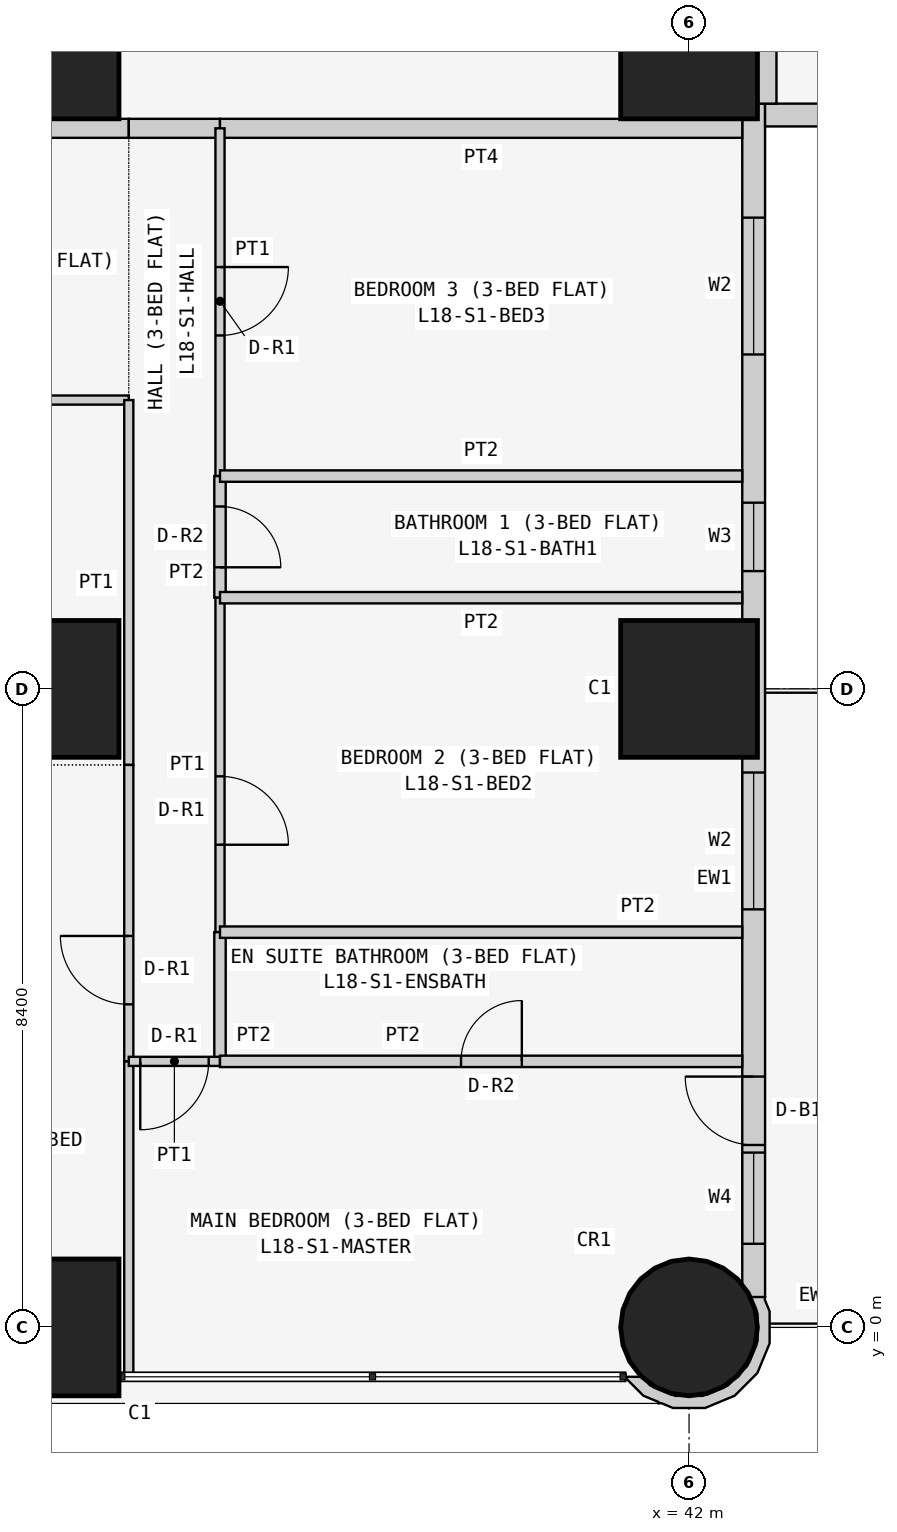
"""IFC4 building model, lengths in metres.
Left out: names, types, materials, properties, quantities, classifications, styles, units other than length and angle.
Written with IfcOpenShell. Run it as: python <this file> out.ifc"""

import sys

from ifc_helpers import new_model, si_unit, direction, frame, frame_2d, origin, origin_2d, place, context, subcontext, project, spatial, polyline, rectangle, circle, outline, extrude, element, fill, save


model = new_model("IFC4")
c1 = context("Model", 3, precision=1e-05, world=origin(), true_north=direction((0.0, 1.0)))
c2 = subcontext(c1, "Body", "Model", "MODEL_VIEW")
j1 = project(units=[si_unit("LENGTHUNIT", "METRE"), si_unit("PLANEANGLEUNIT", "RADIAN")], contexts=[c1])
p1 = place(None, origin())
s1 = spatial("IfcSite", under=j1, at=p1, CompositionType="ELEMENT")
p2 = place(p1, origin())
s2 = spatial("IfcBuilding", under=s1, at=p2, CompositionType="ELEMENT")
p3 = place(p2, frame((0.0, 0.0, 74.1)))
s3 = spatial("IfcBuildingStorey", under=s2, at=p3, CompositionType="ELEMENT", Elevation=74.1)
for number, where, z_axis, x_axis in (
    (1, (33.6, 0.0, 0.0), (0.0, 0.0, 1.0), (1.0, 0.0, 0.0)),
    (2, (33.6, 8.4, 0.0), (0.0, 0.0, 1.0), (1.0, 0.0, 0.0)),
    (3, (33.6, 16.8, 0.0), (0.0, 0.0, 1.0), (1.0, 0.0, 0.0)),
):
    element("IfcColumn", number, at=place(p3, frame(where, z_axis=z_axis, x_axis=x_axis)), inside=s3, PredefinedType="COLUMN", context=c2, shape_type="SweptSolid", body=[
        extrude(rectangle(XDim=1.8, YDim=1.8, at=origin_2d()), origin(), (0.0, 0.0, 1.0), 3.6),
    ])
p4 = place(p3, frame((42.0, 0.0, 0.0), z_axis=(0.0, 0.0, 1.0), x_axis=(1.0, 0.0, 0.0)))
e4 = element("IfcColumn", 4, at=p4, inside=s3, PredefinedType="COLUMN", context=c2, shape_type="SweptSolid", body=[
    extrude(circle(Radius=0.9, at=origin_2d()), origin(), (0.0, 0.0, 1.0), 3.6),
])
for number, where, z_axis, x_axis in (
    (5, (42.0, 8.4, 0.0), (0.0, 0.0, 1.0), (1.0, 0.0, 0.0)),
    (6, (42.0, 16.8, 0.0), (0.0, 0.0, 1.0), (1.0, 0.0, 0.0)),
):
    element("IfcColumn", number, at=place(p3, frame(where, z_axis=z_axis, x_axis=x_axis)), inside=s3, PredefinedType="COLUMN", context=c2, shape_type="SweptSolid", body=[
        extrude(rectangle(XDim=1.8, YDim=1.8, at=origin_2d()), origin(), (0.0, 0.0, 1.0), 3.6),
    ])
p5 = place(p3, frame((42.85, 0.4, 0.0), z_axis=(0.0, 0.0, 1.0), x_axis=(0.0, 1.0, 0.0)))
e7 = element("IfcWall", 7, at=p5, inside=s3, PredefinedType="SOLIDWALL", context=c2, shape_type="SweptSolid", body=[
    extrude(rectangle(XDim=15.7, YDim=0.3, at=frame_2d((7.85, 0.0))), origin(), (0.0, 0.0, 1.0), 3.45),
])
p6 = place(p5, frame((12.4, 0.0, 0.9)))
e8 = element("IfcOpeningElement", 8, at=p6, cuts=e7, PredefinedType="OPENING", context=c2, shape_type="SweptSolid", body=[
    extrude(rectangle(XDim=1.8, YDim=1.5, at=frame_2d((0.9, 0.75))), frame((0.0, 0.16, 0.0), z_axis=(0.0, -1.0, 0.0), x_axis=(1.0, 0.0, 0.0)), (0.0, 0.0, 1.0), 0.32),
])
p7 = place(p5, frame((9.55, 0.0, 1.5)))
e9 = element("IfcOpeningElement", 9, at=p7, cuts=e7, PredefinedType="OPENING", context=c2, shape_type="SweptSolid", body=[
    extrude(rectangle(XDim=0.9, YDim=0.7, at=frame_2d((0.45, 0.35))), frame((0.0, 0.16, 0.0), z_axis=(0.0, -1.0, 0.0), x_axis=(1.0, 0.0, 0.0)), (0.0, 0.0, 1.0), 0.32),
])
p8 = place(p5, frame((5.1, 0.0, 0.9)))
e10 = element("IfcOpeningElement", 10, at=p8, cuts=e7, PredefinedType="OPENING", context=c2, shape_type="SweptSolid", body=[
    extrude(rectangle(XDim=1.8, YDim=1.5, at=frame_2d((0.9, 0.75))), frame((0.0, 0.16, 0.0), z_axis=(0.0, -1.0, 0.0), x_axis=(1.0, 0.0, 0.0)), (0.0, 0.0, 1.0), 0.32),
])
p9 = place(p5, frame((2.0, 0.0, 0.0)))
e11 = element("IfcOpeningElement", 11, at=p9, cuts=e7, PredefinedType="OPENING", context=c2, shape_type="SweptSolid", body=[
    extrude(rectangle(XDim=0.9, YDim=2.4, at=frame_2d((0.45, 1.2))), frame((0.0, 0.16, 0.0), z_axis=(0.0, -1.0, 0.0), x_axis=(1.0, 0.0, 0.0)), (0.0, 0.0, 1.0), 0.32),
])
p10 = place(p5, frame((0.7, 0.0, 0.9)))
e12 = element("IfcOpeningElement", 12, at=p10, cuts=e7, PredefinedType="OPENING", context=c2, shape_type="SweptSolid", body=[
    extrude(rectangle(XDim=1.2, YDim=1.5, at=frame_2d((0.6, 0.75))), frame((0.0, 0.16, 0.0), z_axis=(0.0, -1.0, 0.0), x_axis=(1.0, 0.0, 0.0)), (0.0, 0.0, 1.0), 0.32),
])
p11 = place(p3, frame((43.0, 15.95, 0.0), z_axis=(0.0, 0.0, 1.0), x_axis=(1.0, 0.0, 0.0)))
e13 = element("IfcWall", 13, at=p11, inside=s3, PredefinedType="SOLIDWALL", context=c2, shape_type="SweptSolid", body=[
    extrude(rectangle(XDim=15.4, YDim=0.3, at=frame_2d((7.7, 0.0))), origin(), (0.0, 0.0, 1.0), 3.45),
])
p12 = place(p11, frame((1.2, 0.0, 0.9)))
e14 = element("IfcOpeningElement", 14, at=p12, cuts=e13, PredefinedType="OPENING", context=c2, shape_type="SweptSolid", body=[
    extrude(rectangle(XDim=1.8, YDim=1.5, at=frame_2d((0.9, 0.75))), frame((0.0, 0.16, 0.0), z_axis=(0.0, -1.0, 0.0), x_axis=(1.0, 0.0, 0.0)), (0.0, 0.0, 1.0), 0.32),
])
p13 = place(p11, frame((4.95, 0.0, 1.5)))
e15 = element("IfcOpeningElement", 15, at=p13, cuts=e13, PredefinedType="OPENING", context=c2, shape_type="SweptSolid", body=[
    extrude(rectangle(XDim=0.9, YDim=0.7, at=frame_2d((0.45, 0.35))), frame((0.0, 0.16, 0.0), z_axis=(0.0, -1.0, 0.0), x_axis=(1.0, 0.0, 0.0)), (0.0, 0.0, 1.0), 0.32),
])
p14 = place(p11, frame((8.5, 0.0, 0.9)))
e16 = element("IfcOpeningElement", 16, at=p14, cuts=e13, PredefinedType="OPENING", context=c2, shape_type="SweptSolid", body=[
    extrude(rectangle(XDim=1.8, YDim=1.5, at=frame_2d((0.9, 0.75))), frame((0.0, 0.16, 0.0), z_axis=(0.0, -1.0, 0.0), x_axis=(1.0, 0.0, 0.0)), (0.0, 0.0, 1.0), 0.32),
])
p15 = place(p11, frame((12.5, 0.0, 0.0)))
e17 = element("IfcOpeningElement", 17, at=p15, cuts=e13, PredefinedType="OPENING", context=c2, shape_type="SweptSolid", body=[
    extrude(rectangle(XDim=0.9, YDim=2.4, at=frame_2d((0.45, 1.2))), frame((0.0, 0.16, 0.0), z_axis=(0.0, -1.0, 0.0), x_axis=(1.0, 0.0, 0.0)), (0.0, 0.0, 1.0), 0.32),
])
p16 = place(p11, frame((13.5, 0.0, 0.9)))
e18 = element("IfcOpeningElement", 18, at=p16, cuts=e13, PredefinedType="OPENING", context=c2, shape_type="SweptSolid", body=[
    extrude(rectangle(XDim=1.2, YDim=1.5, at=frame_2d((0.6, 0.75))), frame((0.0, 0.16, 0.0), z_axis=(0.0, -1.0, 0.0), x_axis=(1.0, 0.0, 0.0)), (0.0, 0.0, 1.0), 0.32),
])
p17 = place(p3, frame((41.233, -0.611, 0.0), z_axis=(0.0, 0.0, 1.0), x_axis=(0.377204953059, -0.926129809145, 0.0)))
e19 = element("IfcWall", 19, at=p17, inside=s3, PredefinedType="SOLIDWALL", context=c2, shape_type="SweptSolid", body=[
    extrude(outline(polyline([(0.319, 1.843), (-0.072, 2.001), (-0.24, 2.001), (-0.269, 2.017), (-0.37, 1.841), (-0.102, 1.842), (0.23, 1.707), (0.485, 1.455), (0.624, 1.125), (0.626, 0.766), (0.49, 0.434), (0.239, 0.179), (0.09, 0.117), (0.011, -0.078), (0.024, -0.083), (0.33, 0.045), (0.48, 0.197), (0.499, 0.193), (0.508, 0.225), (0.626, 0.345), (0.785, 0.736), (0.782, 1.157), (0.619, 1.546), (0.319, 1.843)])), origin(), (0.0, 0.0, 1.0), 3.45),
])
p18 = place(p3, frame((43.025, 22.971, 0.0), z_axis=(0.0, 0.0, 1.0), x_axis=(0.0, -1.0, 0.0)))
e20 = element("IfcWall", 20, at=p18, inside=s3, PredefinedType="PARTITIONING", context=c2, shape_type="SweptSolid", body=[
    extrude(rectangle(XDim=6.871, YDim=0.25, at=frame_2d((3.436, 0.0))), origin(), (0.0, 0.0, 1.0), 3.45),
])
p19 = place(p3, frame((34.629, 15.775, 0.0), z_axis=(0.0, 0.0, 1.0), x_axis=(-1.0, 0.0, 0.0)))
e21 = element("IfcWall", 21, at=p19, inside=s3, PredefinedType="PARTITIONING", context=c2, shape_type="SweptSolid", body=[
    extrude(rectangle(XDim=5.229, YDim=0.25, at=frame_2d((2.615, 0.0))), origin(), (0.0, 0.0, 1.0), 3.45),
])
p20 = place(p19, frame((2.129, 0.0, 0.0)))
e22 = element("IfcOpeningElement", 22, at=p20, cuts=e21, PredefinedType="OPENING", context=c2, shape_type="SweptSolid", body=[
    extrude(rectangle(XDim=1.0, YDim=2.1, at=frame_2d((0.5, 1.05))), frame((0.0, 0.135, 0.0), z_axis=(0.0, -1.0, 0.0), x_axis=(1.0, 0.0, 0.0)), (0.0, 0.0, 1.0), 0.27),
])
p21 = place(p3, frame((35.829, 15.775, 0.0), z_axis=(0.0, 0.0, 1.0), x_axis=(-1.0, 0.0, 0.0)))
e23 = element("IfcWall", 23, at=p21, inside=s3, PredefinedType="PARTITIONING", context=c2, shape_type="SweptSolid", body=[
    extrude(rectangle(XDim=1.2, YDim=0.25, at=frame_2d((0.6, 0.0))), origin(), (0.0, 0.0, 1.0), 3.45),
])
p22 = place(p3, frame((42.7, 15.775, 0.0), z_axis=(0.0, 0.0, 1.0), x_axis=(-1.0, 0.0, 0.0)))
e24 = element("IfcWall", 24, at=p22, inside=s3, PredefinedType="PARTITIONING", context=c2, shape_type="SweptSolid", body=[
    extrude(rectangle(XDim=6.871, YDim=0.25, at=frame_2d((3.436, 0.0))), origin(), (0.0, 0.0, 1.0), 3.45),
])
p23 = place(p3, frame((29.4, 12.2, 0.0), z_axis=(0.0, 0.0, 1.0), x_axis=(1.0, 0.0, 0.0)))
e25 = element("IfcWall", 25, at=p23, inside=s3, PredefinedType="PARTITIONING", context=c2, shape_type="SweptSolid", body=[
    extrude(rectangle(XDim=5.229, YDim=0.12, at=frame_2d((2.615, 0.0))), origin(), (0.0, 0.0, 1.0), 3.45),
])
p24 = place(p23, frame((1.05, 0.0, 0.0)))
e26 = element("IfcOpeningElement", 26, at=p24, cuts=e25, PredefinedType="OPENING", context=c2, shape_type="SweptSolid", body=[
    extrude(rectangle(XDim=0.9, YDim=2.1, at=frame_2d((0.45, 1.05))), frame((0.0, 0.07, 0.0), z_axis=(0.0, -1.0, 0.0), x_axis=(1.0, 0.0, 0.0)), (0.0, 0.0, 1.0), 0.14),
])
p25 = place(p3, frame((34.629, 7.4, 0.0), z_axis=(0.0, 0.0, 1.0), x_axis=(0.0, 1.0, 0.0)))
e27 = element("IfcWall", 27, at=p25, inside=s3, PredefinedType="PARTITIONING", context=c2, shape_type="SweptSolid", body=[
    extrude(rectangle(XDim=4.8, YDim=0.12, at=frame_2d((2.4, 0.0))), origin(), (0.0, 0.0, 1.0), 3.45),
])
p26 = place(p3, frame((34.629, 3.5, 0.0), z_axis=(0.0, 0.0, 1.0), x_axis=(0.0, 1.0, 0.0)))
e28 = element("IfcWall", 28, at=p26, inside=s3, PredefinedType="PARTITIONING", context=c2, shape_type="SweptSolid", body=[
    extrude(rectangle(XDim=3.9, YDim=0.12, at=frame_2d((1.95, 0.0))), origin(), (0.0, 0.0, 1.0), 3.45),
])
p27 = place(p26, frame((0.75, 0.0, 0.0)))
e29 = element("IfcOpeningElement", 29, at=p27, cuts=e28, PredefinedType="OPENING", context=c2, shape_type="SweptSolid", body=[
    extrude(rectangle(XDim=0.9, YDim=2.1, at=frame_2d((0.45, 1.05))), frame((0.0, 0.07, 0.0), z_axis=(0.0, -1.0, 0.0), x_axis=(1.0, 0.0, 0.0)), (0.0, 0.0, 1.0), 0.14),
])
p28 = place(p3, frame((34.629, -0.65, 0.0), z_axis=(0.0, 0.0, 1.0), x_axis=(0.0, 1.0, 0.0)))
e30 = element("IfcWall", 30, at=p28, inside=s3, PredefinedType="PARTITIONING", context=c2, shape_type="SweptSolid", body=[
    extrude(rectangle(XDim=4.15, YDim=0.12, at=frame_2d((2.075, 0.0))), origin(), (0.0, 0.0, 1.0), 3.45),
])
p29 = place(p3, frame((35.829, 11.2, 0.0), z_axis=(0.0, 0.0, 1.0), x_axis=(0.0, 1.0, 0.0)))
e31 = element("IfcWall", 31, at=p29, inside=s3, PredefinedType="PARTITIONING", context=c2, shape_type="SweptSolid", body=[
    extrude(rectangle(XDim=4.575, YDim=0.12, at=frame_2d((2.288, 0.0))), origin(), (0.0, 0.0, 1.0), 3.45),
])
p30 = place(p29, frame((1.85, 0.0, 0.0)))
e32 = element("IfcOpeningElement", 32, at=p30, cuts=e31, PredefinedType="OPENING", context=c2, shape_type="SweptSolid", body=[
    extrude(rectangle(XDim=0.9, YDim=2.1, at=frame_2d((0.45, 1.05))), frame((0.0, 0.07, 0.0), z_axis=(0.0, -1.0, 0.0), x_axis=(1.0, 0.0, 0.0)), (0.0, 0.0, 1.0), 0.14),
])
p31 = place(p3, frame((35.829, 9.6, 0.0), z_axis=(0.0, 0.0, 1.0), x_axis=(0.0, 1.0, 0.0)))
e33 = element("IfcWall", 33, at=p31, inside=s3, PredefinedType="PARTITIONING", context=c2, shape_type="SweptSolid", body=[
    extrude(rectangle(XDim=1.6, YDim=0.15, at=frame_2d((0.8, 0.0))), origin(), (0.0, 0.0, 1.0), 3.45),
])
p32 = place(p31, frame((0.4, 0.0, 0.0)))
e34 = element("IfcOpeningElement", 34, at=p32, cuts=e33, PredefinedType="OPENING", context=c2, shape_type="SweptSolid", body=[
    extrude(rectangle(XDim=0.8, YDim=2.1, at=frame_2d((0.4, 1.05))), frame((0.0, 0.085, 0.0), z_axis=(0.0, -1.0, 0.0), x_axis=(1.0, 0.0, 0.0)), (0.0, 0.0, 1.0), 0.17),
])
p33 = place(p3, frame((35.829, 5.2, 0.0), z_axis=(0.0, 0.0, 1.0), x_axis=(0.0, 1.0, 0.0)))
e35 = element("IfcWall", 35, at=p33, inside=s3, PredefinedType="PARTITIONING", context=c2, shape_type="SweptSolid", body=[
    extrude(rectangle(XDim=4.4, YDim=0.12, at=frame_2d((2.2, 0.0))), origin(), (0.0, 0.0, 1.0), 3.45),
])
p34 = place(p33, frame((1.15, 0.0, 0.0)))
e36 = element("IfcOpeningElement", 36, at=p34, cuts=e35, PredefinedType="OPENING", context=c2, shape_type="SweptSolid", body=[
    extrude(rectangle(XDim=0.9, YDim=2.1, at=frame_2d((0.45, 1.05))), frame((0.0, 0.07, 0.0), z_axis=(0.0, -1.0, 0.0), x_axis=(1.0, 0.0, 0.0)), (0.0, 0.0, 1.0), 0.14),
])
p35 = place(p3, frame((35.829, 3.5, 0.0), z_axis=(0.0, 0.0, 1.0), x_axis=(0.0, 1.0, 0.0)))
e37 = element("IfcWall", 37, at=p35, inside=s3, PredefinedType="PARTITIONING", context=c2, shape_type="SweptSolid", body=[
    extrude(rectangle(XDim=1.7, YDim=0.15, at=frame_2d((0.85, 0.0))), origin(), (0.0, 0.0, 1.0), 3.45),
])
p36 = place(p3, frame((34.629, 3.5, 0.0), z_axis=(0.0, 0.0, 1.0), x_axis=(1.0, 0.0, 0.0)))
e38 = element("IfcWall", 38, at=p36, inside=s3, PredefinedType="PARTITIONING", context=c2, shape_type="SweptSolid", body=[
    extrude(rectangle(XDim=1.2, YDim=0.12, at=frame_2d((0.6, 0.0))), origin(), (0.0, 0.0, 1.0), 3.45),
])
p37 = place(p36, frame((0.151, 0.0, 0.0)))
e39 = element("IfcOpeningElement", 39, at=p37, cuts=e38, PredefinedType="OPENING", context=c2, shape_type="SweptSolid", body=[
    extrude(rectangle(XDim=0.9, YDim=2.1, at=frame_2d((0.45, 1.05))), frame((0.0, 0.07, 0.0), z_axis=(0.0, -1.0, 0.0), x_axis=(1.0, 0.0, 0.0)), (0.0, 0.0, 1.0), 0.14),
])
for number, where, z_axis, x_axis in (
    (40, (35.829, 11.2, 0.0), (0.0, 0.0, 1.0), (1.0, 0.0, 0.0)),
    (41, (35.829, 9.6, 0.0), (0.0, 0.0, 1.0), (1.0, 0.0, 0.0)),
    (42, (35.829, 5.2, 0.0), (0.0, 0.0, 1.0), (1.0, 0.0, 0.0)),
):
    element("IfcWall", number, at=place(p3, frame(where, z_axis=z_axis, x_axis=x_axis)), inside=s3, PredefinedType="PARTITIONING", context=c2, shape_type="SweptSolid", body=[
        extrude(rectangle(XDim=6.871, YDim=0.15, at=frame_2d((3.436, 0.0))), origin(), (0.0, 0.0, 1.0), 3.45),
    ])
p38 = place(p3, frame((35.829, 3.5, 0.0), z_axis=(0.0, 0.0, 1.0), x_axis=(1.0, 0.0, 0.0)))
e43 = element("IfcWall", 43, at=p38, inside=s3, PredefinedType="PARTITIONING", context=c2, shape_type="SweptSolid", body=[
    extrude(rectangle(XDim=6.871, YDim=0.15, at=frame_2d((3.436, 0.0))), origin(), (0.0, 0.0, 1.0), 3.45),
])
p39 = place(p38, frame((3.171, 0.0, 0.0)))
e44 = element("IfcOpeningElement", 44, at=p39, cuts=e43, PredefinedType="OPENING", context=c2, shape_type="SweptSolid", body=[
    extrude(rectangle(XDim=0.8, YDim=2.1, at=frame_2d((0.4, 1.05))), frame((0.0, 0.085, 0.0), z_axis=(0.0, -1.0, 0.0), x_axis=(1.0, 0.0, 0.0)), (0.0, 0.0, 1.0), 0.17),
])
p40 = place(p6, origin())
e45 = element("IfcWindow", 45, at=p40, inside=s3, PartitioningType="SINGLE_PANEL", PredefinedType="WINDOW", context=c2, shape_type="SweptSolid", body=[
    extrude(rectangle(XDim=1.8, YDim=1.5, at=frame_2d((0.9, 0.75))), frame((0.0, 0.03, 0.0), z_axis=(0.0, -1.0, 0.0), x_axis=(1.0, 0.0, 0.0)), (0.0, 0.0, 1.0), 0.06),
])
fill(e8, e45)
p41 = place(p7, origin())
e46 = element("IfcWindow", 46, at=p41, inside=s3, PartitioningType="SINGLE_PANEL", PredefinedType="WINDOW", context=c2, shape_type="SweptSolid", body=[
    extrude(rectangle(XDim=0.9, YDim=0.7, at=frame_2d((0.45, 0.35))), frame((0.0, 0.03, 0.0), z_axis=(0.0, -1.0, 0.0), x_axis=(1.0, 0.0, 0.0)), (0.0, 0.0, 1.0), 0.06),
])
fill(e9, e46)
p42 = place(p8, origin())
e47 = element("IfcWindow", 47, at=p42, inside=s3, PartitioningType="SINGLE_PANEL", PredefinedType="WINDOW", context=c2, shape_type="SweptSolid", body=[
    extrude(rectangle(XDim=1.8, YDim=1.5, at=frame_2d((0.9, 0.75))), frame((0.0, 0.03, 0.0), z_axis=(0.0, -1.0, 0.0), x_axis=(1.0, 0.0, 0.0)), (0.0, 0.0, 1.0), 0.06),
])
fill(e10, e47)
p43 = place(p9, origin())
e48 = element("IfcDoor", 48, at=p43, inside=s3, OperationType="SINGLE_SWING_RIGHT", PredefinedType="DOOR", context=c2, shape_type="SweptSolid", body=[
    extrude(rectangle(XDim=0.9, YDim=2.4, at=frame_2d((0.45, 1.2))), frame((0.0, 0.025, 0.0), z_axis=(0.0, -1.0, 0.0), x_axis=(1.0, 0.0, 0.0)), (0.0, 0.0, 1.0), 0.05),
])
fill(e11, e48)
p44 = place(p10, origin())
e49 = element("IfcWindow", 49, at=p44, inside=s3, PartitioningType="SINGLE_PANEL", PredefinedType="WINDOW", context=c2, shape_type="SweptSolid", body=[
    extrude(rectangle(XDim=1.2, YDim=1.5, at=frame_2d((0.6, 0.75))), frame((0.0, 0.03, 0.0), z_axis=(0.0, -1.0, 0.0), x_axis=(1.0, 0.0, 0.0)), (0.0, 0.0, 1.0), 0.06),
])
fill(e12, e49)
p45 = place(p27, origin())
e50 = element("IfcDoor", 50, at=p45, inside=s3, OperationType="SINGLE_SWING_RIGHT", PredefinedType="DOOR", context=c2, shape_type="SweptSolid", body=[
    extrude(rectangle(XDim=0.9, YDim=2.1, at=frame_2d((0.45, 1.05))), frame((0.0, 0.025, 0.0), z_axis=(0.0, -1.0, 0.0), x_axis=(1.0, 0.0, 0.0)), (0.0, 0.0, 1.0), 0.05),
])
fill(e29, e50)
p46 = place(p30, frame((0.9, 0.0, 0.0), z_axis=(0.0, 0.0, 1.0), x_axis=(-1.0, 0.0, 0.0)))
e51 = element("IfcDoor", 51, at=p46, inside=s3, OperationType="SINGLE_SWING_LEFT", PredefinedType="DOOR", context=c2, shape_type="SweptSolid", body=[
    extrude(rectangle(XDim=0.9, YDim=2.1, at=frame_2d((0.45, 1.05))), frame((0.0, 0.025, 0.0), z_axis=(0.0, -1.0, 0.0), x_axis=(1.0, 0.0, 0.0)), (0.0, 0.0, 1.0), 0.05),
])
fill(e32, e51)
p47 = place(p32, frame((0.8, 0.0, 0.0), z_axis=(0.0, 0.0, 1.0), x_axis=(-1.0, 0.0, 0.0)))
e52 = element("IfcDoor", 52, at=p47, inside=s3, OperationType="SINGLE_SWING_RIGHT", PredefinedType="DOOR", context=c2, shape_type="SweptSolid", body=[
    extrude(rectangle(XDim=0.8, YDim=2.1, at=frame_2d((0.4, 1.05))), frame((0.0, 0.025, 0.0), z_axis=(0.0, -1.0, 0.0), x_axis=(1.0, 0.0, 0.0)), (0.0, 0.0, 1.0), 0.05),
])
fill(e34, e52)
p48 = place(p34, frame((0.9, 0.0, 0.0), z_axis=(0.0, 0.0, 1.0), x_axis=(-1.0, 0.0, 0.0)))
e53 = element("IfcDoor", 53, at=p48, inside=s3, OperationType="SINGLE_SWING_RIGHT", PredefinedType="DOOR", context=c2, shape_type="SweptSolid", body=[
    extrude(rectangle(XDim=0.9, YDim=2.1, at=frame_2d((0.45, 1.05))), frame((0.0, 0.025, 0.0), z_axis=(0.0, -1.0, 0.0), x_axis=(1.0, 0.0, 0.0)), (0.0, 0.0, 1.0), 0.05),
])
fill(e36, e53)
p49 = place(p37, frame((0.9, 0.0, 0.0), z_axis=(0.0, 0.0, 1.0), x_axis=(-1.0, 0.0, 0.0)))
e54 = element("IfcDoor", 54, at=p49, inside=s3, OperationType="SINGLE_SWING_RIGHT", PredefinedType="DOOR", context=c2, shape_type="SweptSolid", body=[
    extrude(rectangle(XDim=0.9, YDim=2.1, at=frame_2d((0.45, 1.05))), frame((0.0, 0.025, 0.0), z_axis=(0.0, -1.0, 0.0), x_axis=(1.0, 0.0, 0.0)), (0.0, 0.0, 1.0), 0.05),
])
fill(e39, e54)
p50 = place(p39, origin())
e55 = element("IfcDoor", 55, at=p50, inside=s3, OperationType="SINGLE_SWING_RIGHT", PredefinedType="DOOR", context=c2, shape_type="SweptSolid", body=[
    extrude(rectangle(XDim=0.8, YDim=2.1, at=frame_2d((0.4, 1.05))), frame((0.0, 0.025, 0.0), z_axis=(0.0, -1.0, 0.0), x_axis=(1.0, 0.0, 0.0)), (0.0, 0.0, 1.0), 0.05),
])
fill(e44, e55)
save(model, sys.argv[1])
